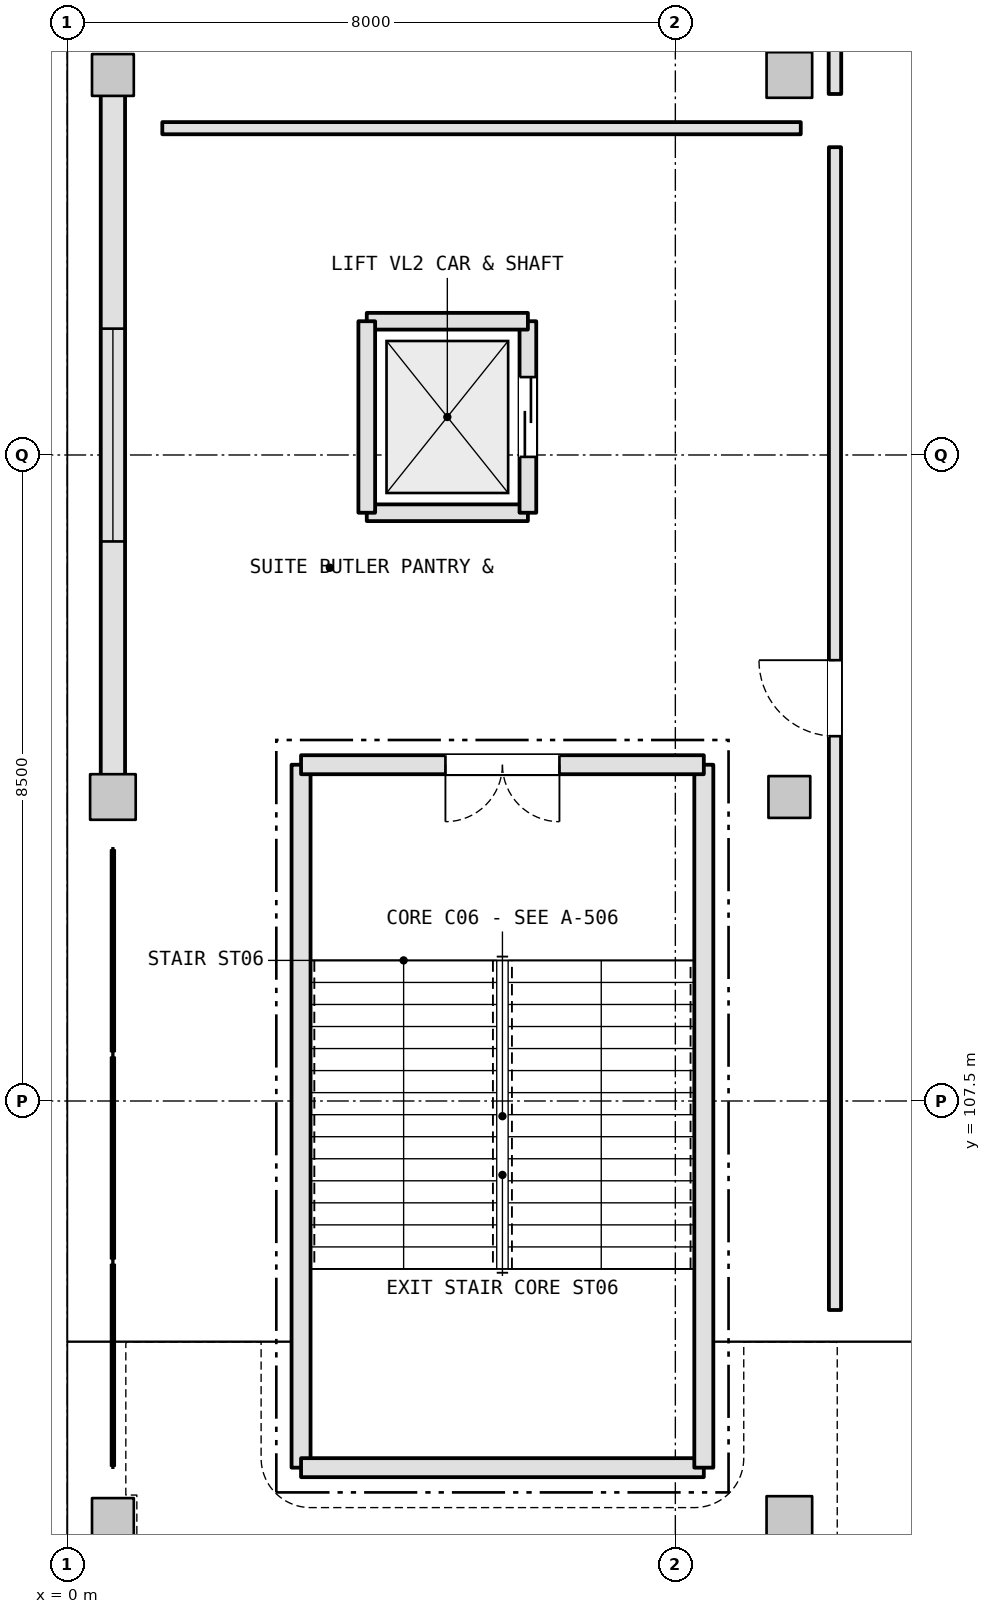
"""IFC4 building model, lengths in metres.
Left out: names, types, materials, properties, quantities, classifications, styles, units other than length and angle.
Written with IfcOpenShell. Run it as: python <this file> out.ifc"""

import sys

from ifc_helpers import new_model, si_unit, direction, frame, frame_2d, origin, origin_2d, place, context, subcontext, project, spatial, rectangle, extrude, element, fill, save


model = new_model("IFC4")
c1 = context("Model", 3, precision=1e-05, world=origin(), true_north=direction((0.0, 1.0)))
c2 = subcontext(c1, "Body", "Model", "MODEL_VIEW")
j1 = project(units=[si_unit("LENGTHUNIT", "METRE"), si_unit("PLANEANGLEUNIT", "RADIAN")], contexts=[c1])
p1 = place(None, origin())
s1 = spatial("IfcSite", under=j1, at=p1, CompositionType="ELEMENT")
p2 = place(p1, origin())
s2 = spatial("IfcBuilding", under=s1, at=p2, CompositionType="ELEMENT")
p3 = place(p2, frame((0.0, 0.0, 16.2)))
s3 = spatial("IfcBuildingStorey", under=s2, at=p3, CompositionType="ELEMENT", Elevation=16.2)
p4 = place(p3, frame((0.6, 102.0, 0.0), z_axis=(0.0, 0.0, 1.0), x_axis=(1.0, 0.0, 0.0)))
e1 = element("IfcColumn", 1, at=p4, inside=s3, PredefinedType="COLUMN", context=c2, shape_type="SweptSolid", body=[
    extrude(rectangle(XDim=0.55, YDim=0.55, at=origin_2d()), origin(), (0.0, 0.0, 1.0), 5.4),
])
p5 = place(p3, frame((0.6, 111.5, 0.0), z_axis=(0.0, 0.0, 1.0), x_axis=(1.0, 0.0, 0.0)))
e2 = element("IfcColumn", 2, at=p5, inside=s3, PredefinedType="COLUMN", context=c2, shape_type="SweptSolid", body=[
    extrude(rectangle(XDim=0.6, YDim=0.6, at=origin_2d()), origin(), (0.0, 0.0, 1.0), 5.4),
])
p6 = place(p3, frame((0.6, 121.0, 0.0), z_axis=(0.0, 0.0, 1.0), x_axis=(1.0, 0.0, 0.0)))
e3 = element("IfcColumn", 3, at=p6, inside=s3, PredefinedType="COLUMN", context=c2, shape_type="SweptSolid", body=[
    extrude(rectangle(XDim=0.55, YDim=0.55, at=origin_2d()), origin(), (0.0, 0.0, 1.0), 5.4),
])
p7 = place(p3, frame((9.5, 102.0, 0.0), z_axis=(0.0, 0.0, 1.0), x_axis=(1.0, 0.0, 0.0)))
e4 = element("IfcColumn", 4, at=p7, inside=s3, PredefinedType="COLUMN", context=c2, shape_type="SweptSolid", body=[
    extrude(rectangle(XDim=0.6, YDim=0.6, at=origin_2d()), origin(), (0.0, 0.0, 1.0), 5.4),
])
p8 = place(p3, frame((9.5, 111.5, 0.0), z_axis=(0.0, 0.0, 1.0), x_axis=(1.0, 0.0, 0.0)))
e5 = element("IfcColumn", 5, at=p8, inside=s3, PredefinedType="COLUMN", context=c2, shape_type="SweptSolid", body=[
    extrude(rectangle(XDim=0.55, YDim=0.55, at=origin_2d()), origin(), (0.0, 0.0, 1.0), 5.4),
])
p9 = place(p3, frame((9.5, 121.0, 0.0), z_axis=(0.0, 0.0, 1.0), x_axis=(1.0, 0.0, 0.0)))
e6 = element("IfcColumn", 6, at=p9, inside=s3, PredefinedType="COLUMN", context=c2, shape_type="SweptSolid", body=[
    extrude(rectangle(XDim=0.6, YDim=0.6, at=origin_2d()), origin(), (0.0, 0.0, 1.0), 5.4),
])
p10 = place(p3, frame((0.6, 111.788, 0.0), z_axis=(0.0, 0.0, 1.0), x_axis=(0.0, 1.0, 0.0)))
e7 = element("IfcWall", 7, at=p10, inside=s3, PredefinedType="SOLIDWALL", context=c2, shape_type="SweptSolid", body=[
    extrude(rectangle(XDim=8.949, YDim=0.32, at=frame_2d((4.475, 0.0))), origin(), (0.0, 0.0, 1.0), 4.475),
])
p11 = place(p10, frame((3.074, 0.0, 1.05)))
e8 = element("IfcOpeningElement", 8, at=p11, cuts=e7, PredefinedType="OPENING", context=c2, shape_type="SweptSolid", body=[
    extrude(rectangle(XDim=2.8, YDim=1.4, at=frame_2d((1.4, 0.7))), frame((0.0, 0.17, 0.0), z_axis=(0.0, -1.0, 0.0), x_axis=(1.0, 0.0, 0.0)), (0.0, 0.0, 1.0), 0.34),
])
p12 = place(p3, frame((3.075, 111.925, 0.0), z_axis=(0.0, 0.0, 1.0), x_axis=(0.0, -1.0, 0.0)))
e9 = element("IfcWall", 9, at=p12, inside=s3, PredefinedType="SHEAR", context=c2, shape_type="SweptSolid", body=[
    extrude(rectangle(XDim=9.249, YDim=0.25, at=frame_2d((4.625, 0.0))), origin(), (0.0, 0.0, 1.0), 5.14),
])
p13 = place(p3, frame((3.075, 102.675, 0.0), z_axis=(0.0, 0.0, 1.0), x_axis=(1.0, 0.0, 0.0)))
e10 = element("IfcWall", 10, at=p13, inside=s3, PredefinedType="SHEAR", context=c2, shape_type="SweptSolid", body=[
    extrude(rectangle(XDim=5.299, YDim=0.25, at=frame_2d((2.649, 0.0))), origin(), (0.0, 0.0, 1.0), 5.14),
])
p14 = place(p3, frame((8.375, 102.675, 0.0), z_axis=(0.0, 0.0, 1.0), x_axis=(0.0, 1.0, 0.0)))
e11 = element("IfcWall", 11, at=p14, inside=s3, PredefinedType="SHEAR", context=c2, shape_type="SweptSolid", body=[
    extrude(rectangle(XDim=9.249, YDim=0.25, at=frame_2d((4.625, 0.0))), origin(), (0.0, 0.0, 1.0), 5.14),
])
p15 = place(p3, frame((8.375, 111.925, 0.0), z_axis=(0.0, 0.0, 1.0), x_axis=(-1.0, 0.0, 0.0)))
e12 = element("IfcWall", 12, at=p15, inside=s3, PredefinedType="SHEAR", context=c2, shape_type="SweptSolid", body=[
    extrude(rectangle(XDim=5.299, YDim=0.25, at=frame_2d((2.649, 0.0))), origin(), (0.0, 0.0, 1.0), 5.14),
])
p16 = place(p15, frame((1.9, 0.0, 0.0)))
e13 = element("IfcOpeningElement", 13, at=p16, cuts=e12, PredefinedType="OPENING", context=c2, shape_type="SweptSolid", body=[
    extrude(rectangle(XDim=1.5, YDim=2.2, at=frame_2d((0.75, 1.1))), frame((0.0, 0.135, 0.0), z_axis=(0.0, -1.0, 0.0), x_axis=(1.0, 0.0, 0.0)), (0.0, 0.0, 1.0), 0.27),
])
p17 = place(p3, frame((3.94, 115.24, 0.0), z_axis=(0.0, 0.0, 1.0), x_axis=(1.0, 0.0, 0.0)))
e14 = element("IfcWall", 14, at=p17, inside=s3, PredefinedType="SHEAR", context=c2, shape_type="SweptSolid", body=[
    extrude(rectangle(XDim=2.12, YDim=0.22, at=frame_2d((1.06, 0.0))), origin(), (0.0, 0.0, 1.0), 5.14),
])
p18 = place(p3, frame((6.06, 115.24, 0.0), z_axis=(0.0, 0.0, 1.0), x_axis=(0.0, 1.0, 0.0)))
e15 = element("IfcWall", 15, at=p18, inside=s3, PredefinedType="SHEAR", context=c2, shape_type="SweptSolid", body=[
    extrude(rectangle(XDim=2.52, YDim=0.22, at=frame_2d((1.26, 0.0))), origin(), (0.0, 0.0, 1.0), 5.14),
])
p19 = place(p18, frame((0.735, 0.0, 0.0)))
e16 = element("IfcOpeningElement", 16, at=p19, cuts=e15, PredefinedType="OPENING", context=c2, shape_type="SweptSolid", body=[
    extrude(rectangle(XDim=1.05, YDim=2.15, at=frame_2d((0.525, 1.075))), frame((0.0, 0.12, 0.0), z_axis=(0.0, -1.0, 0.0), x_axis=(1.0, 0.0, 0.0)), (0.0, 0.0, 1.0), 0.24),
])
p20 = place(p3, frame((6.06, 117.76, 0.0), z_axis=(0.0, 0.0, 1.0), x_axis=(-1.0, 0.0, 0.0)))
e17 = element("IfcWall", 17, at=p20, inside=s3, PredefinedType="SHEAR", context=c2, shape_type="SweptSolid", body=[
    extrude(rectangle(XDim=2.12, YDim=0.22, at=frame_2d((1.06, 0.0))), origin(), (0.0, 0.0, 1.0), 5.14),
])
p21 = place(p3, frame((3.94, 117.76, 0.0), z_axis=(0.0, 0.0, 1.0), x_axis=(0.0, -1.0, 0.0)))
e18 = element("IfcWall", 18, at=p21, inside=s3, PredefinedType="SHEAR", context=c2, shape_type="SweptSolid", body=[
    extrude(rectangle(XDim=2.52, YDim=0.22, at=frame_2d((1.26, 0.0))), origin(), (0.0, 0.0, 1.0), 5.14),
])
p22 = place(p3, frame((10.1, 120.05, 0.0), z_axis=(0.0, 0.0, 1.0), x_axis=(0.0, -1.0, 0.0)))
e19 = element("IfcWall", 19, at=p22, inside=s3, PredefinedType="PARTITIONING", context=c2, shape_type="SweptSolid", body=[
    extrude(rectangle(XDim=15.3, YDim=0.16, at=frame_2d((7.65, 0.0))), origin(), (0.0, 0.0, 1.0), 4.668),
])
p23 = place(p22, frame((6.75, 0.0, 0.0)))
e20 = element("IfcOpeningElement", 20, at=p23, cuts=e19, PredefinedType="OPENING", context=c2, shape_type="SweptSolid", body=[
    extrude(rectangle(XDim=1.0, YDim=2.15, at=frame_2d((0.5, 1.075))), frame((0.0, 0.09, 0.0), z_axis=(0.0, -1.0, 0.0), x_axis=(1.0, 0.0, 0.0)), (0.0, 0.0, 1.0), 0.18),
])
p24 = place(p3, frame((1.25, 120.3, 0.0), z_axis=(0.0, 0.0, 1.0), x_axis=(1.0, 0.0, 0.0)))
e21 = element("IfcWall", 21, at=p24, inside=s3, PredefinedType="PARTITIONING", context=c2, shape_type="SweptSolid", body=[
    extrude(rectangle(XDim=8.4, YDim=0.16, at=frame_2d((4.2, 0.0))), origin(), (0.0, 0.0, 1.0), 4.475),
])
p25 = place(p3, frame((10.1, 129.05, 0.0), z_axis=(0.0, 0.0, 1.0), x_axis=(0.0, -1.0, 0.0)))
e22 = element("IfcWall", 22, at=p25, inside=s3, PredefinedType="PARTITIONING", context=c2, shape_type="SweptSolid", body=[
    extrude(rectangle(XDim=8.3, YDim=0.165, at=frame_2d((4.15, 0.0))), origin(), (0.0, 0.0, 1.0), 4.668),
])
p26 = place(p25, frame((4.41, 0.0, 0.0)))
e23 = element("IfcOpeningElement", 23, at=p26, cuts=e22, PredefinedType="OPENING", context=c2, shape_type="SweptSolid", body=[
    extrude(rectangle(XDim=1.08, YDim=2.25, at=frame_2d((0.54, 1.125))), frame((0.0, 0.093, 0.0), z_axis=(0.0, -1.0, 0.0), x_axis=(1.0, 0.0, 0.0)), (0.0, 0.0, 1.0), 0.185),
])
p27 = place(p11, origin())
e24 = element("IfcWindow", 24, at=p27, inside=s3, PartitioningType="SINGLE_PANEL", PredefinedType="WINDOW", context=c2, shape_type="SweptSolid", body=[
    extrude(rectangle(XDim=2.8, YDim=1.4, at=frame_2d((1.4, 0.7))), frame((0.0, 0.03, 0.0), z_axis=(0.0, -1.0, 0.0), x_axis=(1.0, 0.0, 0.0)), (0.0, 0.0, 1.0), 0.06),
])
fill(e8, e24)
p28 = place(p16, origin())
e25 = element("IfcDoor", 25, at=p28, inside=s3, OperationType="DOUBLE_DOOR_SINGLE_SWING", PredefinedType="DOOR", context=c2, shape_type="SweptSolid", body=[
    extrude(rectangle(XDim=1.5, YDim=2.2, at=frame_2d((0.75, 1.1))), frame((0.0, 0.025, 0.0), z_axis=(0.0, -1.0, 0.0), x_axis=(1.0, 0.0, 0.0)), (0.0, 0.0, 1.0), 0.05),
])
fill(e13, e25)
p29 = place(p19, origin())
e26 = element("IfcDoor", 26, at=p29, inside=s3, OperationType="DOUBLE_DOOR_SLIDING", PredefinedType="DOOR", context=c2, shape_type="SweptSolid", body=[
    extrude(rectangle(XDim=1.05, YDim=2.15, at=frame_2d((0.525, 1.075))), frame((0.0, 0.025, 0.0), z_axis=(0.0, -1.0, 0.0), x_axis=(1.0, 0.0, 0.0)), (0.0, 0.0, 1.0), 0.05),
])
fill(e16, e26)
p30 = place(p23, frame((1.0, 0.0, 0.0), z_axis=(0.0, 0.0, 1.0), x_axis=(-1.0, 0.0, 0.0)))
e27 = element("IfcDoor", 27, at=p30, inside=s3, OperationType="SINGLE_SWING_LEFT", PredefinedType="DOOR", context=c2, shape_type="SweptSolid", body=[
    extrude(rectangle(XDim=1.0, YDim=2.15, at=frame_2d((0.5, 1.075))), frame((0.0, 0.025, 0.0), z_axis=(0.0, -1.0, 0.0), x_axis=(1.0, 0.0, 0.0)), (0.0, 0.0, 1.0), 0.05),
])
fill(e20, e27)
save(model, sys.argv[1])
